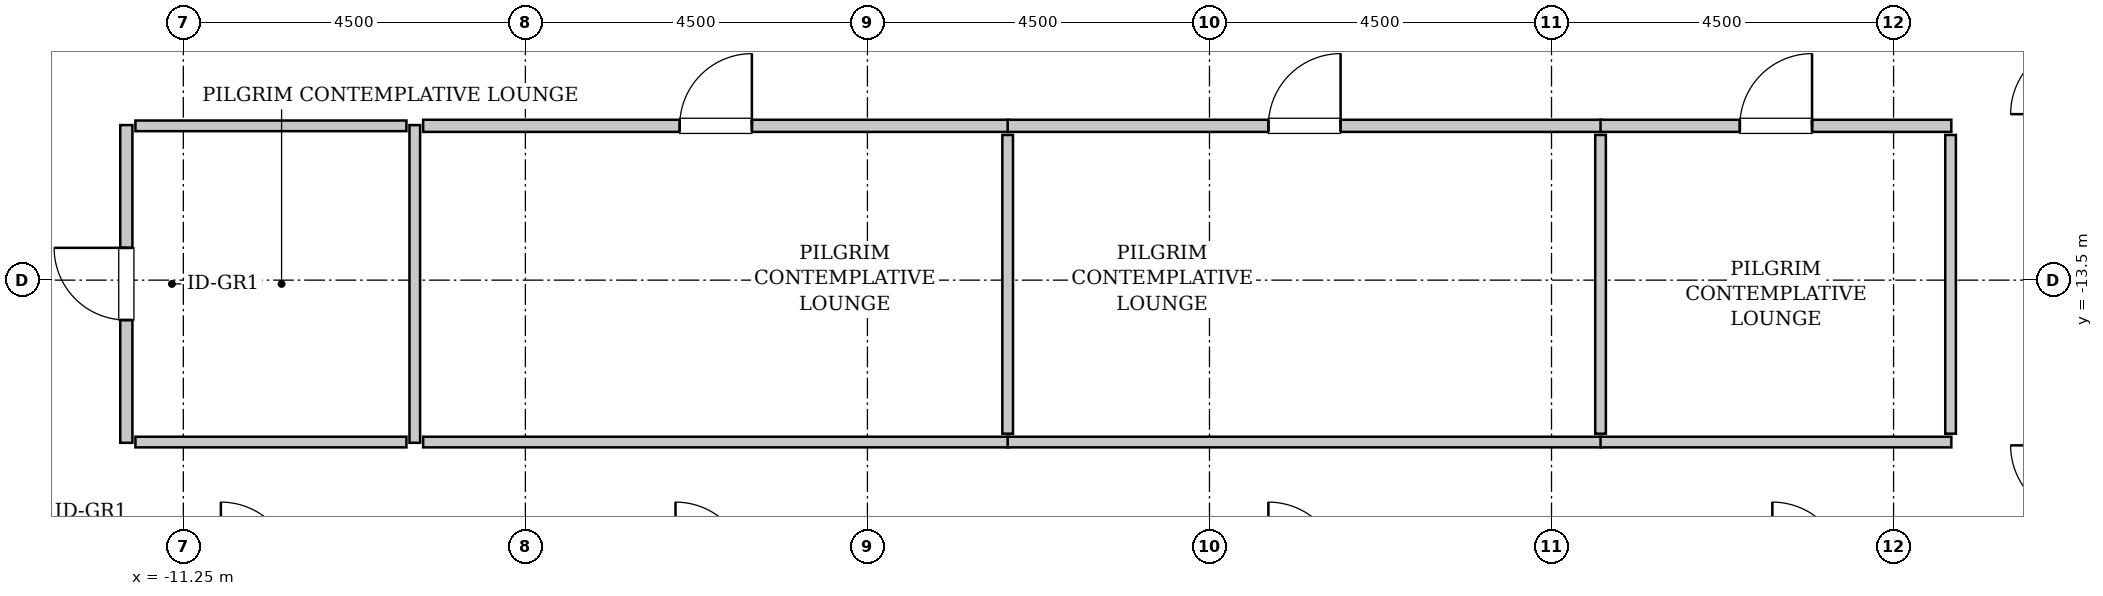
"""IFC4 building model, lengths in metres.
Left out: names, types, materials, properties, quantities, classifications, styles, units other than length and angle.
Written with IfcOpenShell. Run it as: python <this file> out.ifc"""

import sys

from ifc_helpers import new_model, si_unit, direction, frame, frame_2d, origin, place, context, subcontext, project, spatial, rectangle, extrude, source, transform, mapped, element, fill, save


model = new_model("IFC4")
c1 = context("Model", 3, precision=1e-05, world=origin(), true_north=direction((0.0, 1.0)))
c2 = subcontext(c1, "Body", "Model", "MODEL_VIEW")
j1 = project(units=[si_unit("LENGTHUNIT", "METRE"), si_unit("PLANEANGLEUNIT", "RADIAN")], contexts=[c1])
p1 = place(None, origin())
s1 = spatial("IfcSite", under=j1, at=p1, CompositionType="ELEMENT")
p2 = place(p1, origin())
s2 = spatial("IfcBuilding", under=s1, at=p2, CompositionType="ELEMENT")
p3 = place(p2, frame((0.0, 0.0, 210.4)))
s3 = spatial("IfcBuildingStorey", under=s2, at=p3, CompositionType="ELEMENT", Elevation=210.4)
m1 = source(origin(), c2, "Body", "SweptSolid", [
    extrude(rectangle(XDim=4.18, YDim=0.16, at=frame_2d((2.09, 0.0))), origin(), (0.0, 0.0, 1.0), 3.535),
])
p4 = place(p3, frame((-12.0, -15.64, 0.0), z_axis=(0.0, 0.0, 1.0), x_axis=(0.0, 1.0, 0.0)))
e1 = element("IfcWall", 1, at=p4, inside=s3, PredefinedType="PARTITIONING", context=c2, shape_type="MappedRepresentation", body=[
    mapped(m1, transform((0.0, 0.0, 0.0), x_axis=(1.0, 0.0, 0.0), y_axis=(0.0, 1.0, 0.0), z_axis=(0.0, 0.0, 1.0), scale=1.0)),
])
p5 = place(p4, frame((1.615, 0.0, 0.0)))
e2 = element("IfcOpeningElement", 2, at=p5, cuts=e1, PredefinedType="OPENING", context=c2, shape_type="SweptSolid", body=[
    extrude(rectangle(XDim=0.95, YDim=2.1, at=frame_2d((0.475, 1.05))), frame((0.0, 0.09, 0.0), z_axis=(0.0, -1.0, 0.0), x_axis=(1.0, 0.0, 0.0)), (0.0, 0.0, 1.0), 0.18),
])
m2 = source(origin(), c2, "Body", "SweptSolid", [
    extrude(rectangle(XDim=4.18, YDim=0.14, at=frame_2d((2.09, 0.0))), origin(), (0.0, 0.0, 1.0), 3.535),
])
p6 = place(p3, frame((-8.205, -15.64, 0.0), z_axis=(0.0, 0.0, 1.0), x_axis=(0.0, 1.0, 0.0)))
e3 = element("IfcWall", 3, at=p6, inside=s3, PredefinedType="PARTITIONING", context=c2, shape_type="MappedRepresentation", body=[
    mapped(m2, transform((0.0, 0.0, 0.0), x_axis=(1.0, 0.0, 0.0), y_axis=(0.0, 1.0, 0.0), z_axis=(0.0, 0.0, 1.0), scale=1.0)),
])
m3 = source(origin(), c2, "Body", "SweptSolid", [
    extrude(rectangle(XDim=3.565, YDim=0.14, at=frame_2d((1.782, 0.0))), origin(), (0.0, 0.0, 1.0), 3.535),
])
for number, where, z_axis, x_axis in (
    (4, (-11.88, -11.47, 0.0), (0.0, 0.0, 1.0), (1.0, 0.0, 0.0)),
    (5, (-11.88, -15.63, 0.0), (0.0, 0.0, 1.0), (1.0, 0.0, 0.0)),
):
    element("IfcWall", number, at=place(p3, frame(where, z_axis=z_axis, x_axis=x_axis)), inside=s3, PredefinedType="PARTITIONING", context=c2, shape_type="MappedRepresentation", body=[
        mapped(m3, transform((0.0, 0.0, 0.0), x_axis=(1.0, 0.0, 0.0), y_axis=(0.0, 1.0, 0.0), z_axis=(0.0, 0.0, 1.0), scale=1.0)),
    ])
m4 = source(origin(), c2, "Body", "SweptSolid", [
    extrude(rectangle(XDim=7.7, YDim=0.16, at=frame_2d((3.85, 0.0))), origin(), (0.0, 0.0, 1.0), 3.535),
])
p7 = place(p3, frame((-8.095, -11.47, 0.0), z_axis=(0.0, 0.0, 1.0), x_axis=(1.0, 0.0, 0.0)))
e6 = element("IfcWall", 6, at=p7, inside=s3, PredefinedType="PARTITIONING", context=c2, shape_type="MappedRepresentation", body=[
    mapped(m4, transform((0.0, 0.0, 0.0), x_axis=(1.0, 0.0, 0.0), y_axis=(0.0, 1.0, 0.0), z_axis=(0.0, 0.0, 1.0), scale=1.0)),
])
p8 = place(p7, frame((3.375, 0.0, 0.0)))
e7 = element("IfcOpeningElement", 7, at=p8, cuts=e6, PredefinedType="OPENING", context=c2, shape_type="SweptSolid", body=[
    extrude(rectangle(XDim=0.95, YDim=2.1, at=frame_2d((0.475, 1.05))), frame((0.0, 0.09, 0.0), z_axis=(0.0, -1.0, 0.0), x_axis=(1.0, 0.0, 0.0)), (0.0, 0.0, 1.0), 0.18),
])
m5 = source(origin(), c2, "Body", "SweptSolid", [
    extrude(rectangle(XDim=7.7, YDim=0.14, at=frame_2d((3.85, 0.0))), origin(), (0.0, 0.0, 1.0), 3.535),
])
p9 = place(p3, frame((-8.095, -15.63, 0.0), z_axis=(0.0, 0.0, 1.0), x_axis=(1.0, 0.0, 0.0)))
e8 = element("IfcWall", 8, at=p9, inside=s3, PredefinedType="PARTITIONING", context=c2, shape_type="MappedRepresentation", body=[
    mapped(m5, transform((0.0, 0.0, 0.0), x_axis=(1.0, 0.0, 0.0), y_axis=(0.0, 1.0, 0.0), z_axis=(0.0, 0.0, 1.0), scale=1.0)),
])
m6 = source(origin(), c2, "Body", "SweptSolid", [
    extrude(rectangle(XDim=3.93, YDim=0.14, at=frame_2d((1.965, 0.0))), origin(), (0.0, 0.0, 1.0), 3.535),
])
p10 = place(p3, frame((-0.405, -15.52, 0.0), z_axis=(0.0, 0.0, 1.0), x_axis=(0.0, 1.0, 0.0)))
e9 = element("IfcWall", 9, at=p10, inside=s3, PredefinedType="PARTITIONING", context=c2, shape_type="MappedRepresentation", body=[
    mapped(m6, transform((0.0, 0.0, 0.0), x_axis=(1.0, 0.0, 0.0), y_axis=(0.0, 1.0, 0.0), z_axis=(0.0, 0.0, 1.0), scale=1.0)),
])
m7 = source(origin(), c2, "Body", "SweptSolid", [
    extrude(rectangle(XDim=7.81, YDim=0.16, at=frame_2d((3.905, 0.0))), origin(), (0.0, 0.0, 1.0), 3.535),
])
p11 = place(p3, frame((-0.405, -11.47, 0.0), z_axis=(0.0, 0.0, 1.0), x_axis=(1.0, 0.0, 0.0)))
e10 = element("IfcWall", 10, at=p11, inside=s3, PredefinedType="PARTITIONING", context=c2, shape_type="MappedRepresentation", body=[
    mapped(m7, transform((0.0, 0.0, 0.0), x_axis=(1.0, 0.0, 0.0), y_axis=(0.0, 1.0, 0.0), z_axis=(0.0, 0.0, 1.0), scale=1.0)),
])
p12 = place(p11, frame((3.43, 0.0, 0.0)))
e11 = element("IfcOpeningElement", 11, at=p12, cuts=e10, PredefinedType="OPENING", context=c2, shape_type="SweptSolid", body=[
    extrude(rectangle(XDim=0.95, YDim=2.1, at=frame_2d((0.475, 1.05))), frame((0.0, 0.09, 0.0), z_axis=(0.0, -1.0, 0.0), x_axis=(1.0, 0.0, 0.0)), (0.0, 0.0, 1.0), 0.18),
])
m8 = source(origin(), c2, "Body", "SweptSolid", [
    extrude(rectangle(XDim=7.81, YDim=0.14, at=frame_2d((3.905, 0.0))), origin(), (0.0, 0.0, 1.0), 3.535),
])
p13 = place(p3, frame((-0.405, -15.63, 0.0), z_axis=(0.0, 0.0, 1.0), x_axis=(1.0, 0.0, 0.0)))
e12 = element("IfcWall", 12, at=p13, inside=s3, PredefinedType="PARTITIONING", context=c2, shape_type="MappedRepresentation", body=[
    mapped(m8, transform((0.0, 0.0, 0.0), x_axis=(1.0, 0.0, 0.0), y_axis=(0.0, 1.0, 0.0), z_axis=(0.0, 0.0, 1.0), scale=1.0)),
])
p14 = place(p3, frame((7.395, -15.52, 0.0), z_axis=(0.0, 0.0, 1.0), x_axis=(0.0, 1.0, 0.0)))
e13 = element("IfcWall", 13, at=p14, inside=s3, PredefinedType="PARTITIONING", context=c2, shape_type="MappedRepresentation", body=[
    mapped(m6, transform((0.0, 0.0, 0.0), x_axis=(1.0, 0.0, 0.0), y_axis=(0.0, 1.0, 0.0), z_axis=(0.0, 0.0, 1.0), scale=1.0)),
])
m9 = source(origin(), c2, "Body", "SweptSolid", [
    extrude(rectangle(XDim=4.615, YDim=0.16, at=frame_2d((2.308, 0.0))), origin(), (0.0, 0.0, 1.0), 3.535),
])
p15 = place(p3, frame((7.395, -11.47, 0.0), z_axis=(0.0, 0.0, 1.0), x_axis=(1.0, 0.0, 0.0)))
e14 = element("IfcWall", 14, at=p15, inside=s3, PredefinedType="PARTITIONING", context=c2, shape_type="MappedRepresentation", body=[
    mapped(m9, transform((0.0, 0.0, 0.0), x_axis=(1.0, 0.0, 0.0), y_axis=(0.0, 1.0, 0.0), z_axis=(0.0, 0.0, 1.0), scale=1.0)),
])
p16 = place(p15, frame((1.833, 0.0, 0.0)))
e15 = element("IfcOpeningElement", 15, at=p16, cuts=e14, PredefinedType="OPENING", context=c2, shape_type="SweptSolid", body=[
    extrude(rectangle(XDim=0.95, YDim=2.1, at=frame_2d((0.475, 1.05))), frame((0.0, 0.09, 0.0), z_axis=(0.0, -1.0, 0.0), x_axis=(1.0, 0.0, 0.0)), (0.0, 0.0, 1.0), 0.18),
])
m10 = source(origin(), c2, "Body", "SweptSolid", [
    extrude(rectangle(XDim=4.615, YDim=0.14, at=frame_2d((2.308, 0.0))), origin(), (0.0, 0.0, 1.0), 3.535),
])
p17 = place(p3, frame((7.395, -15.63, 0.0), z_axis=(0.0, 0.0, 1.0), x_axis=(1.0, 0.0, 0.0)))
e16 = element("IfcWall", 16, at=p17, inside=s3, PredefinedType="PARTITIONING", context=c2, shape_type="MappedRepresentation", body=[
    mapped(m10, transform((0.0, 0.0, 0.0), x_axis=(1.0, 0.0, 0.0), y_axis=(0.0, 1.0, 0.0), z_axis=(0.0, 0.0, 1.0), scale=1.0)),
])
p18 = place(p3, frame((12.0, -15.52, 0.0), z_axis=(0.0, 0.0, 1.0), x_axis=(0.0, 1.0, 0.0)))
e17 = element("IfcWall", 17, at=p18, inside=s3, PredefinedType="PARTITIONING", context=c2, shape_type="MappedRepresentation", body=[
    mapped(m6, transform((0.0, 0.0, 0.0), x_axis=(1.0, 0.0, 0.0), y_axis=(0.0, 1.0, 0.0), z_axis=(0.0, 0.0, 1.0), scale=1.0)),
])
m11 = source(origin(), c2, "Body", "SweptSolid", [
    extrude(rectangle(XDim=0.95, YDim=2.1, at=frame_2d((0.475, 1.05))), frame((0.0, 0.025, 0.0), z_axis=(0.0, -1.0, 0.0), x_axis=(1.0, 0.0, 0.0)), (0.0, 0.0, 1.0), 0.05),
])
p19 = place(p5, origin())
e18 = element("IfcDoor", 18, at=p19, inside=s3, OperationType="SINGLE_SWING_RIGHT", PredefinedType="DOOR", context=c2, shape_type="MappedRepresentation", body=[
    mapped(m11, transform((0.0, 0.0, 0.0), x_axis=(1.0, 0.0, 0.0), y_axis=(0.0, 1.0, 0.0), z_axis=(0.0, 0.0, 1.0), scale=1.0)),
])
fill(e2, e18)
p20 = place(p8, origin())
e19 = element("IfcDoor", 19, at=p20, inside=s3, OperationType="SINGLE_SWING_RIGHT", PredefinedType="DOOR", context=c2, shape_type="MappedRepresentation", body=[
    mapped(m11, transform((0.0, 0.0, 0.0), x_axis=(1.0, 0.0, 0.0), y_axis=(0.0, 1.0, 0.0), z_axis=(0.0, 0.0, 1.0), scale=1.0)),
])
fill(e7, e19)
p21 = place(p12, origin())
e20 = element("IfcDoor", 20, at=p21, inside=s3, OperationType="SINGLE_SWING_RIGHT", PredefinedType="DOOR", context=c2, shape_type="MappedRepresentation", body=[
    mapped(m11, transform((0.0, 0.0, 0.0), x_axis=(1.0, 0.0, 0.0), y_axis=(0.0, 1.0, 0.0), z_axis=(0.0, 0.0, 1.0), scale=1.0)),
])
fill(e11, e20)
p22 = place(p16, origin())
e21 = element("IfcDoor", 21, at=p22, inside=s3, OperationType="SINGLE_SWING_RIGHT", PredefinedType="DOOR", context=c2, shape_type="MappedRepresentation", body=[
    mapped(m11, transform((0.0, 0.0, 0.0), x_axis=(1.0, 0.0, 0.0), y_axis=(0.0, 1.0, 0.0), z_axis=(0.0, 0.0, 1.0), scale=1.0)),
])
fill(e15, e21)
save(model, sys.argv[1])
